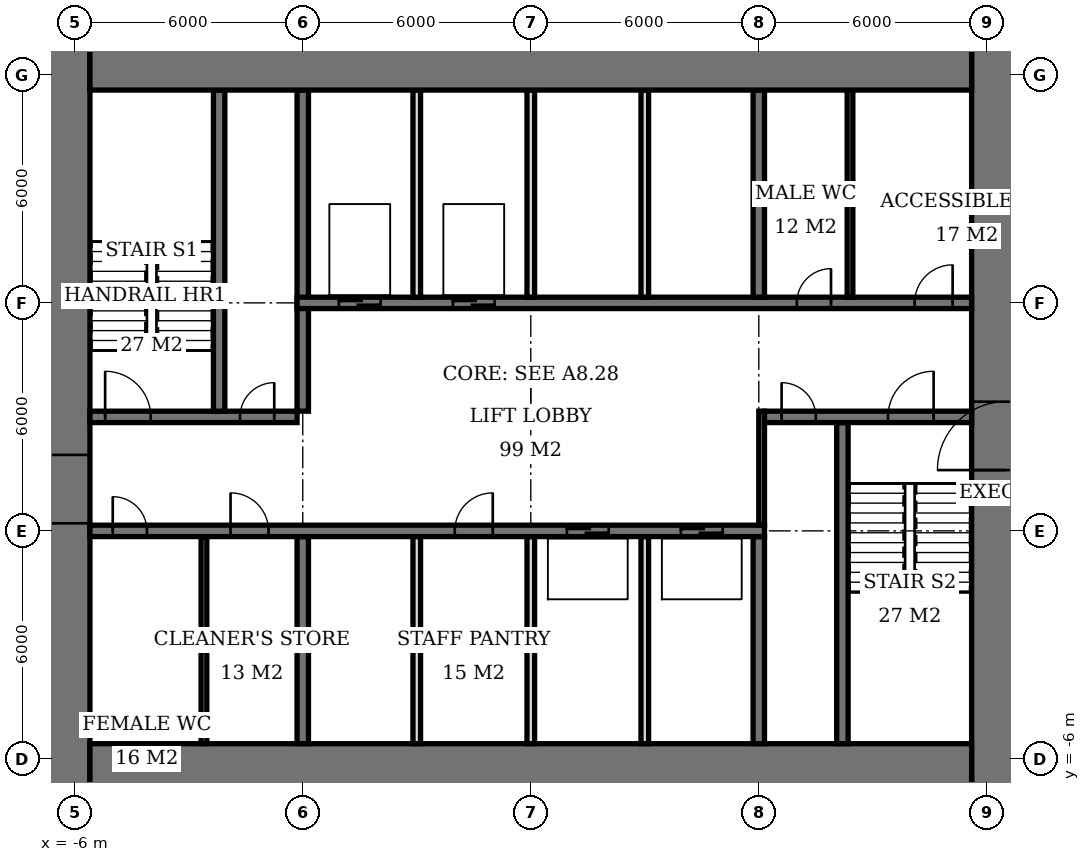
"""IFC4 building model, lengths in metres.
Left out: names, types, materials, properties, quantities, classifications, styles, units other than length and angle.
Written with IfcOpenShell. Run it as: python <this file> out.ifc"""

import sys

from ifc_helpers import new_model, si_unit, direction, frame, frame_2d, origin, place, context, subcontext, project, spatial, rectangle, extrude, element, fill, save


model = new_model("IFC4")
c1 = context("Model", 3, precision=1e-05, world=origin(), true_north=direction((0.0, 1.0)))
c2 = subcontext(c1, "Body", "Model", "MODEL_VIEW")
j1 = project(units=[si_unit("LENGTHUNIT", "METRE"), si_unit("PLANEANGLEUNIT", "RADIAN")], contexts=[c1])
p1 = place(None, origin())
s1 = spatial("IfcSite", under=j1, at=p1, CompositionType="ELEMENT")
p2 = place(p1, origin())
s2 = spatial("IfcBuilding", under=s1, at=p2, CompositionType="ELEMENT")
p3 = place(p2, frame((0.0, 0.0, 260.6)))
s3 = spatial("IfcBuildingStorey", under=s2, at=p3, CompositionType="ELEMENT", Elevation=260.6)
for number, where, z_axis, x_axis in (
    (1, (-5.6, -6.6, 0.0), (0.0, 0.0, 1.0), (1.0, 0.0, 0.0)),
    (2, (-5.6, 12.6, 0.0), (0.0, 0.0, 1.0), (1.0, 0.0, 0.0)),
):
    element("IfcWall", number, at=place(p3, frame(where, z_axis=z_axis, x_axis=x_axis)), inside=s3, PredefinedType="SHEAR", context=c2, shape_type="SweptSolid", body=[
        extrude(rectangle(XDim=23.2, YDim=2.0, at=frame_2d((11.6, 0.0))), origin(), (0.0, 0.0, 1.0), 3.9),
    ])
p4 = place(p3, frame((-6.5, -7.6, 0.0), z_axis=(0.0, 0.0, 1.0), x_axis=(0.0, 1.0, 0.0)))
e3 = element("IfcWall", 3, at=p4, inside=s3, PredefinedType="SHEAR", context=c2, shape_type="SweptSolid", body=[
    extrude(rectangle(XDim=21.2, YDim=1.8, at=frame_2d((10.6, 0.0))), origin(), (0.0, 0.0, 1.0), 3.9),
])
p5 = place(p4, frame((7.8, 0.0, 0.0)))
e4 = element("IfcOpeningElement", 4, at=p5, cuts=e3, PredefinedType="OPENING", context=c2, shape_type="SweptSolid", body=[
    extrude(rectangle(XDim=1.8, YDim=2.4, at=frame_2d((0.9, 1.2))), frame((0.0, 0.91, 0.0), z_axis=(0.0, -1.0, 0.0), x_axis=(1.0, 0.0, 0.0)), (0.0, 0.0, 1.0), 1.82),
])
p6 = place(p3, frame((18.5, -7.6, 0.0), z_axis=(0.0, 0.0, 1.0), x_axis=(0.0, 1.0, 0.0)))
e5 = element("IfcWall", 5, at=p6, inside=s3, PredefinedType="SHEAR", context=c2, shape_type="SweptSolid", body=[
    extrude(rectangle(XDim=21.2, YDim=1.8, at=frame_2d((10.6, 0.0))), origin(), (0.0, 0.0, 1.0), 3.9),
])
p7 = place(p6, frame((9.2, 0.0, 0.0)))
e6 = element("IfcOpeningElement", 6, at=p7, cuts=e5, PredefinedType="OPENING", context=c2, shape_type="SweptSolid", body=[
    extrude(rectangle(XDim=1.8, YDim=2.4, at=frame_2d((0.9, 1.2))), frame((0.0, 0.91, 0.0), z_axis=(0.0, -1.0, 0.0), x_axis=(1.0, 0.0, 0.0)), (0.0, 0.0, 1.0), 1.82),
])
p8 = place(p3, frame((-5.6, 0.0, 0.0), z_axis=(0.0, 0.0, 1.0), x_axis=(1.0, 0.0, 0.0)))
e7 = element("IfcWall", 7, at=p8, inside=s3, PredefinedType="SHEAR", context=c2, shape_type="SweptSolid", body=[
    extrude(rectangle(XDim=17.75, YDim=0.3, at=frame_2d((8.875, 0.0))), origin(), (0.0, 0.0, 1.0), 3.9),
])
p9 = place(p8, frame((0.6, 0.0, 0.0)))
e8 = element("IfcOpeningElement", 8, at=p9, cuts=e7, PredefinedType="OPENING", context=c2, shape_type="SweptSolid", body=[
    extrude(rectangle(XDim=0.9, YDim=2.1, at=frame_2d((0.45, 1.05))), frame((0.0, 0.16, 0.0), z_axis=(0.0, -1.0, 0.0), x_axis=(1.0, 0.0, 0.0)), (0.0, 0.0, 1.0), 0.32),
])
p10 = place(p8, frame((3.7, 0.0, 0.0)))
e9 = element("IfcOpeningElement", 9, at=p10, cuts=e7, PredefinedType="OPENING", context=c2, shape_type="SweptSolid", body=[
    extrude(rectangle(XDim=1.0, YDim=2.1, at=frame_2d((0.5, 1.05))), frame((0.0, 0.16, 0.0), z_axis=(0.0, -1.0, 0.0), x_axis=(1.0, 0.0, 0.0)), (0.0, 0.0, 1.0), 0.32),
])
p11 = place(p8, frame((9.6, 0.0, 0.0)))
e10 = element("IfcOpeningElement", 10, at=p11, cuts=e7, PredefinedType="OPENING", context=c2, shape_type="SweptSolid", body=[
    extrude(rectangle(XDim=1.0, YDim=2.1, at=frame_2d((0.5, 1.05))), frame((0.0, 0.16, 0.0), z_axis=(0.0, -1.0, 0.0), x_axis=(1.0, 0.0, 0.0)), (0.0, 0.0, 1.0), 0.32),
])
p12 = place(p8, frame((12.55, 0.0, 0.0)))
e11 = element("IfcOpeningElement", 11, at=p12, cuts=e7, PredefinedType="OPENING", context=c2, shape_type="SweptSolid", body=[
    extrude(rectangle(XDim=1.1, YDim=2.1, at=frame_2d((0.55, 1.05))), frame((0.0, 0.16, 0.0), z_axis=(0.0, -1.0, 0.0), x_axis=(1.0, 0.0, 0.0)), (0.0, 0.0, 1.0), 0.32),
])
p13 = place(p8, frame((15.55, 0.0, 0.0)))
e12 = element("IfcOpeningElement", 12, at=p13, cuts=e7, PredefinedType="OPENING", context=c2, shape_type="SweptSolid", body=[
    extrude(rectangle(XDim=1.1, YDim=2.1, at=frame_2d((0.55, 1.05))), frame((0.0, 0.16, 0.0), z_axis=(0.0, -1.0, 0.0), x_axis=(1.0, 0.0, 0.0)), (0.0, 0.0, 1.0), 0.32),
])
p14 = place(p3, frame((-5.6, 3.0, 0.0), z_axis=(0.0, 0.0, 1.0), x_axis=(1.0, 0.0, 0.0)))
e13 = element("IfcWall", 13, at=p14, inside=s3, PredefinedType="SHEAR", context=c2, shape_type="SweptSolid", body=[
    extrude(rectangle(XDim=5.45, YDim=0.3, at=frame_2d((2.725, 0.0))), origin(), (0.0, 0.0, 1.0), 3.9),
])
p15 = place(p14, frame((0.4, 0.0, 0.0)))
e14 = element("IfcOpeningElement", 14, at=p15, cuts=e13, PredefinedType="OPENING", context=c2, shape_type="SweptSolid", body=[
    extrude(rectangle(XDim=1.2, YDim=2.1, at=frame_2d((0.6, 1.05))), frame((0.0, 0.16, 0.0), z_axis=(0.0, -1.0, 0.0), x_axis=(1.0, 0.0, 0.0)), (0.0, 0.0, 1.0), 0.32),
])
p16 = place(p14, frame((3.95, 0.0, 0.0)))
e15 = element("IfcOpeningElement", 15, at=p16, cuts=e13, PredefinedType="OPENING", context=c2, shape_type="SweptSolid", body=[
    extrude(rectangle(XDim=0.9, YDim=2.1, at=frame_2d((0.45, 1.05))), frame((0.0, 0.16, 0.0), z_axis=(0.0, -1.0, 0.0), x_axis=(1.0, 0.0, 0.0)), (0.0, 0.0, 1.0), 0.32),
])
p17 = place(p3, frame((12.15, 3.0, 0.0), z_axis=(0.0, 0.0, 1.0), x_axis=(1.0, 0.0, 0.0)))
e16 = element("IfcWall", 16, at=p17, inside=s3, PredefinedType="SHEAR", context=c2, shape_type="SweptSolid", body=[
    extrude(rectangle(XDim=5.45, YDim=0.3, at=frame_2d((2.725, 0.0))), origin(), (0.0, 0.0, 1.0), 3.9),
])
p18 = place(p17, frame((3.25, 0.0, 0.0)))
e17 = element("IfcOpeningElement", 17, at=p18, cuts=e16, PredefinedType="OPENING", context=c2, shape_type="SweptSolid", body=[
    extrude(rectangle(XDim=1.2, YDim=2.1, at=frame_2d((0.6, 1.05))), frame((0.0, 0.16, 0.0), z_axis=(0.0, -1.0, 0.0), x_axis=(1.0, 0.0, 0.0)), (0.0, 0.0, 1.0), 0.32),
])
p19 = place(p17, frame((0.45, 0.0, 0.0)))
e18 = element("IfcOpeningElement", 18, at=p19, cuts=e16, PredefinedType="OPENING", context=c2, shape_type="SweptSolid", body=[
    extrude(rectangle(XDim=0.9, YDim=2.1, at=frame_2d((0.45, 1.05))), frame((0.0, 0.16, 0.0), z_axis=(0.0, -1.0, 0.0), x_axis=(1.0, 0.0, 0.0)), (0.0, 0.0, 1.0), 0.32),
])
p20 = place(p3, frame((-0.15, 6.0, 0.0), z_axis=(0.0, 0.0, 1.0), x_axis=(1.0, 0.0, 0.0)))
e19 = element("IfcWall", 19, at=p20, inside=s3, PredefinedType="SHEAR", context=c2, shape_type="SweptSolid", body=[
    extrude(rectangle(XDim=17.75, YDim=0.3, at=frame_2d((8.875, 0.0))), origin(), (0.0, 0.0, 1.0), 3.9),
])
p21 = place(p20, frame((13.15, 0.0, 0.0)))
e20 = element("IfcOpeningElement", 20, at=p21, cuts=e19, PredefinedType="OPENING", context=c2, shape_type="SweptSolid", body=[
    extrude(rectangle(XDim=0.9, YDim=2.1, at=frame_2d((0.45, 1.05))), frame((0.0, 0.16, 0.0), z_axis=(0.0, -1.0, 0.0), x_axis=(1.0, 0.0, 0.0)), (0.0, 0.0, 1.0), 0.32),
])
p22 = place(p20, frame((16.25, 0.0, 0.0)))
e21 = element("IfcOpeningElement", 21, at=p22, cuts=e19, PredefinedType="OPENING", context=c2, shape_type="SweptSolid", body=[
    extrude(rectangle(XDim=1.0, YDim=2.1, at=frame_2d((0.5, 1.05))), frame((0.0, 0.16, 0.0), z_axis=(0.0, -1.0, 0.0), x_axis=(1.0, 0.0, 0.0)), (0.0, 0.0, 1.0), 0.32),
])
p23 = place(p20, frame((1.1, 0.0, 0.0)))
e22 = element("IfcOpeningElement", 22, at=p23, cuts=e19, PredefinedType="OPENING", context=c2, shape_type="SweptSolid", body=[
    extrude(rectangle(XDim=1.1, YDim=2.1, at=frame_2d((0.55, 1.05))), frame((0.0, 0.16, 0.0), z_axis=(0.0, -1.0, 0.0), x_axis=(1.0, 0.0, 0.0)), (0.0, 0.0, 1.0), 0.32),
])
p24 = place(p20, frame((4.1, 0.0, 0.0)))
e23 = element("IfcOpeningElement", 23, at=p24, cuts=e19, PredefinedType="OPENING", context=c2, shape_type="SweptSolid", body=[
    extrude(rectangle(XDim=1.1, YDim=2.1, at=frame_2d((0.55, 1.05))), frame((0.0, 0.16, 0.0), z_axis=(0.0, -1.0, 0.0), x_axis=(1.0, 0.0, 0.0)), (0.0, 0.0, 1.0), 0.32),
])
p25 = place(p3, frame((0.0, -5.6, 0.0), z_axis=(0.0, 0.0, 1.0), x_axis=(0.0, 1.0, 0.0)))
e24 = element("IfcWall", 24, at=p25, inside=s3, PredefinedType="SHEAR", context=c2, shape_type="SweptSolid", body=[
    extrude(rectangle(XDim=5.45, YDim=0.3, at=frame_2d((2.725, 0.0))), origin(), (0.0, 0.0, 1.0), 3.9),
])
p26 = place(p3, frame((0.0, 3.15, 0.0), z_axis=(0.0, 0.0, 1.0), x_axis=(0.0, 1.0, 0.0)))
e25 = element("IfcWall", 25, at=p26, inside=s3, PredefinedType="SHEAR", context=c2, shape_type="SweptSolid", body=[
    extrude(rectangle(XDim=8.45, YDim=0.3, at=frame_2d((4.225, 0.0))), origin(), (0.0, 0.0, 1.0), 3.9),
])
for number, where, z_axis, x_axis in (
    (26, (12.0, -5.6, 0.0), (0.0, 0.0, 1.0), (0.0, 1.0, 0.0)),
    (27, (12.0, 6.15, 0.0), (0.0, 0.0, 1.0), (0.0, 1.0, 0.0)),
):
    element("IfcWall", number, at=place(p3, frame(where, z_axis=z_axis, x_axis=x_axis)), inside=s3, PredefinedType="SHEAR", context=c2, shape_type="SweptSolid", body=[
        extrude(rectangle(XDim=5.45, YDim=0.3, at=frame_2d((2.725, 0.0))), origin(), (0.0, 0.0, 1.0), 3.9),
    ])
for number, where, z_axis, x_axis in (
    (28, (-2.2, 3.15, 0.0), (0.0, 0.0, 1.0), (0.0, 1.0, 0.0)),
    (29, (14.2, -5.6, 0.0), (0.0, 0.0, 1.0), (0.0, 1.0, 0.0)),
):
    element("IfcWall", number, at=place(p3, frame(where, z_axis=z_axis, x_axis=x_axis)), inside=s3, PredefinedType="SHEAR", context=c2, shape_type="SweptSolid", body=[
        extrude(rectangle(XDim=8.45, YDim=0.3, at=frame_2d((4.225, 0.0))), origin(), (0.0, 0.0, 1.0), 3.9),
    ])
for number, where, z_axis, x_axis in (
    (30, (3.0, 6.15, 0.0), (0.0, 0.0, 1.0), (0.0, 1.0, 0.0)),
    (31, (6.0, 6.15, 0.0), (0.0, 0.0, 1.0), (0.0, 1.0, 0.0)),
    (32, (9.0, 6.15, 0.0), (0.0, 0.0, 1.0), (0.0, 1.0, 0.0)),
    (33, (3.0, -5.6, 0.0), (0.0, 0.0, 1.0), (0.0, 1.0, 0.0)),
    (34, (6.0, -5.6, 0.0), (0.0, 0.0, 1.0), (0.0, 1.0, 0.0)),
    (35, (9.0, -5.6, 0.0), (0.0, 0.0, 1.0), (0.0, 1.0, 0.0)),
):
    element("IfcWall", number, at=place(p3, frame(where, z_axis=z_axis, x_axis=x_axis)), inside=s3, PredefinedType="SOLIDWALL", context=c2, shape_type="SweptSolid", body=[
        extrude(rectangle(XDim=5.45, YDim=0.2, at=frame_2d((2.725, 0.0))), origin(), (0.0, 0.0, 1.0), 3.9),
    ])
for number, where, z_axis, x_axis in (
    (36, (-2.6, -5.6, 0.0), (0.0, 0.0, 1.0), (0.0, 1.0, 0.0)),
    (37, (14.4, 6.15, 0.0), (0.0, 0.0, 1.0), (0.0, 1.0, 0.0)),
):
    element("IfcWall", number, at=place(p3, frame(where, z_axis=z_axis, x_axis=x_axis)), inside=s3, PredefinedType="PLUMBINGWALL", context=c2, shape_type="SweptSolid", body=[
        extrude(rectangle(XDim=5.45, YDim=0.15, at=frame_2d((2.725, 0.0))), origin(), (0.0, 0.0, 1.0), 3.65),
    ])
p27 = place(p3, frame((12.075, 0.15, 0.0), z_axis=(0.0, 0.0, 1.0), x_axis=(0.0, 1.0, 0.0)))
e38 = element("IfcWall", 38, at=p27, inside=s3, PredefinedType="PARTITIONING", context=c2, shape_type="SweptSolid", body=[
    extrude(rectangle(XDim=3.0, YDim=0.15, at=frame_2d((1.5, 0.0))), origin(), (0.0, 0.0, 1.0), 3.65),
])
p28 = place(p5, origin())
e39 = element("IfcDoor", 39, at=p28, inside=s3, OperationType="DOUBLE_DOOR_SINGLE_SWING", PredefinedType="DOOR", context=c2, shape_type="SweptSolid", body=[
    extrude(rectangle(XDim=1.8, YDim=2.4, at=frame_2d((0.9, 1.2))), frame((0.0, 0.025, 0.0), z_axis=(0.0, -1.0, 0.0), x_axis=(1.0, 0.0, 0.0)), (0.0, 0.0, 1.0), 0.05),
])
fill(e4, e39)
p29 = place(p7, origin())
e40 = element("IfcDoor", 40, at=p29, inside=s3, OperationType="DOUBLE_DOOR_SINGLE_SWING", PredefinedType="DOOR", context=c2, shape_type="SweptSolid", body=[
    extrude(rectangle(XDim=1.8, YDim=2.4, at=frame_2d((0.9, 1.2))), frame((0.0, 0.025, 0.0), z_axis=(0.0, -1.0, 0.0), x_axis=(1.0, 0.0, 0.0)), (0.0, 0.0, 1.0), 0.05),
])
fill(e6, e40)
p30 = place(p15, origin())
e41 = element("IfcDoor", 41, at=p30, inside=s3, OperationType="SINGLE_SWING_LEFT", PredefinedType="DOOR", context=c2, shape_type="SweptSolid", body=[
    extrude(rectangle(XDim=1.2, YDim=2.1, at=frame_2d((0.6, 1.05))), frame((0.0, 0.025, 0.0), z_axis=(0.0, -1.0, 0.0), x_axis=(1.0, 0.0, 0.0)), (0.0, 0.0, 1.0), 0.05),
])
fill(e14, e41)
p31 = place(p16, origin())
e42 = element("IfcDoor", 42, at=p31, inside=s3, OperationType="SINGLE_SWING_RIGHT", PredefinedType="DOOR", context=c2, shape_type="SweptSolid", body=[
    extrude(rectangle(XDim=0.9, YDim=2.1, at=frame_2d((0.45, 1.05))), frame((0.0, 0.025, 0.0), z_axis=(0.0, -1.0, 0.0), x_axis=(1.0, 0.0, 0.0)), (0.0, 0.0, 1.0), 0.05),
])
fill(e15, e42)
p32 = place(p18, origin())
e43 = element("IfcDoor", 43, at=p32, inside=s3, OperationType="SINGLE_SWING_RIGHT", PredefinedType="DOOR", context=c2, shape_type="SweptSolid", body=[
    extrude(rectangle(XDim=1.2, YDim=2.1, at=frame_2d((0.6, 1.05))), frame((0.0, 0.025, 0.0), z_axis=(0.0, -1.0, 0.0), x_axis=(1.0, 0.0, 0.0)), (0.0, 0.0, 1.0), 0.05),
])
fill(e17, e43)
p33 = place(p19, origin())
e44 = element("IfcDoor", 44, at=p33, inside=s3, OperationType="SINGLE_SWING_LEFT", PredefinedType="DOOR", context=c2, shape_type="SweptSolid", body=[
    extrude(rectangle(XDim=0.9, YDim=2.1, at=frame_2d((0.45, 1.05))), frame((0.0, 0.025, 0.0), z_axis=(0.0, -1.0, 0.0), x_axis=(1.0, 0.0, 0.0)), (0.0, 0.0, 1.0), 0.05),
])
fill(e18, e44)
p34 = place(p9, origin())
e45 = element("IfcDoor", 45, at=p34, inside=s3, OperationType="SINGLE_SWING_LEFT", PredefinedType="DOOR", context=c2, shape_type="SweptSolid", body=[
    extrude(rectangle(XDim=0.9, YDim=2.1, at=frame_2d((0.45, 1.05))), frame((0.0, 0.025, 0.0), z_axis=(0.0, -1.0, 0.0), x_axis=(1.0, 0.0, 0.0)), (0.0, 0.0, 1.0), 0.05),
])
fill(e8, e45)
p35 = place(p10, origin())
e46 = element("IfcDoor", 46, at=p35, inside=s3, OperationType="SINGLE_SWING_LEFT", PredefinedType="DOOR", context=c2, shape_type="SweptSolid", body=[
    extrude(rectangle(XDim=1.0, YDim=2.1, at=frame_2d((0.5, 1.05))), frame((0.0, 0.025, 0.0), z_axis=(0.0, -1.0, 0.0), x_axis=(1.0, 0.0, 0.0)), (0.0, 0.0, 1.0), 0.05),
])
fill(e9, e46)
p36 = place(p21, origin())
e47 = element("IfcDoor", 47, at=p36, inside=s3, OperationType="SINGLE_SWING_RIGHT", PredefinedType="DOOR", context=c2, shape_type="SweptSolid", body=[
    extrude(rectangle(XDim=0.9, YDim=2.1, at=frame_2d((0.45, 1.05))), frame((0.0, 0.025, 0.0), z_axis=(0.0, -1.0, 0.0), x_axis=(1.0, 0.0, 0.0)), (0.0, 0.0, 1.0), 0.05),
])
fill(e20, e47)
p37 = place(p22, origin())
e48 = element("IfcDoor", 48, at=p37, inside=s3, OperationType="SINGLE_SWING_RIGHT", PredefinedType="DOOR", context=c2, shape_type="SweptSolid", body=[
    extrude(rectangle(XDim=1.0, YDim=2.1, at=frame_2d((0.5, 1.05))), frame((0.0, 0.025, 0.0), z_axis=(0.0, -1.0, 0.0), x_axis=(1.0, 0.0, 0.0)), (0.0, 0.0, 1.0), 0.05),
])
fill(e21, e48)
p38 = place(p11, origin())
e49 = element("IfcDoor", 49, at=p38, inside=s3, OperationType="SINGLE_SWING_RIGHT", PredefinedType="DOOR", context=c2, shape_type="SweptSolid", body=[
    extrude(rectangle(XDim=1.0, YDim=2.1, at=frame_2d((0.5, 1.05))), frame((0.0, 0.025, 0.0), z_axis=(0.0, -1.0, 0.0), x_axis=(1.0, 0.0, 0.0)), (0.0, 0.0, 1.0), 0.05),
])
fill(e10, e49)
p39 = place(p23, origin())
e50 = element("IfcDoor", 50, at=p39, inside=s3, OperationType="DOUBLE_DOOR_SLIDING", PredefinedType="USERDEFINED", context=c2, shape_type="SweptSolid", body=[
    extrude(rectangle(XDim=1.1, YDim=2.1, at=frame_2d((0.55, 1.05))), frame((0.0, 0.025, 0.0), z_axis=(0.0, -1.0, 0.0), x_axis=(1.0, 0.0, 0.0)), (0.0, 0.0, 1.0), 0.05),
])
fill(e22, e50)
p40 = place(p24, origin())
e51 = element("IfcDoor", 51, at=p40, inside=s3, OperationType="DOUBLE_DOOR_SLIDING", PredefinedType="USERDEFINED", context=c2, shape_type="SweptSolid", body=[
    extrude(rectangle(XDim=1.1, YDim=2.1, at=frame_2d((0.55, 1.05))), frame((0.0, 0.025, 0.0), z_axis=(0.0, -1.0, 0.0), x_axis=(1.0, 0.0, 0.0)), (0.0, 0.0, 1.0), 0.05),
])
fill(e23, e51)
p41 = place(p12, origin())
e52 = element("IfcDoor", 52, at=p41, inside=s3, OperationType="DOUBLE_DOOR_SLIDING", PredefinedType="USERDEFINED", context=c2, shape_type="SweptSolid", body=[
    extrude(rectangle(XDim=1.1, YDim=2.1, at=frame_2d((0.55, 1.05))), frame((0.0, 0.025, 0.0), z_axis=(0.0, -1.0, 0.0), x_axis=(1.0, 0.0, 0.0)), (0.0, 0.0, 1.0), 0.05),
])
fill(e11, e52)
p42 = place(p13, origin())
e53 = element("IfcDoor", 53, at=p42, inside=s3, OperationType="DOUBLE_DOOR_SLIDING", PredefinedType="USERDEFINED", context=c2, shape_type="SweptSolid", body=[
    extrude(rectangle(XDim=1.1, YDim=2.1, at=frame_2d((0.55, 1.05))), frame((0.0, 0.025, 0.0), z_axis=(0.0, -1.0, 0.0), x_axis=(1.0, 0.0, 0.0)), (0.0, 0.0, 1.0), 0.05),
])
fill(e12, e53)
save(model, sys.argv[1])
